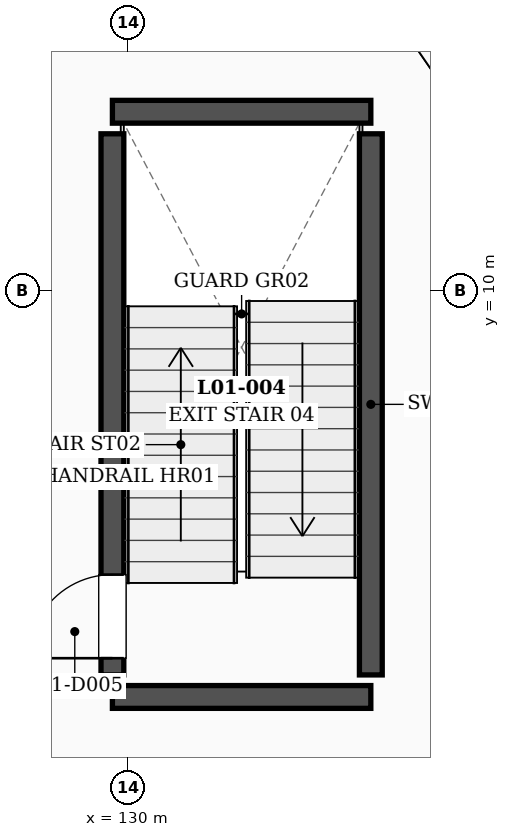
"""IFC4 building model, lengths in metres.
Left out: names, types, materials, properties, quantities, classifications, styles, units other than length and angle.
Written with IfcOpenShell. Run it as: python <this file> out.ifc"""

import sys

from ifc_helpers import new_model, si_unit, direction, frame, frame_2d, origin, place, context, subcontext, project, spatial, rectangle, extrude, element, fill, save


model = new_model("IFC4")
c1 = context("Model", 3, precision=1e-05, world=origin(), true_north=direction((0.0, 1.0)))
c2 = subcontext(c1, "Body", "Model", "MODEL_VIEW")
j1 = project(units=[si_unit("LENGTHUNIT", "METRE"), si_unit("PLANEANGLEUNIT", "RADIAN")], contexts=[c1])
p1 = place(None, origin())
s1 = spatial("IfcSite", under=j1, at=p1, CompositionType="ELEMENT")
p2 = place(p1, origin())
s2 = spatial("IfcBuilding", under=s1, at=p2, CompositionType="ELEMENT")
p3 = place(p2, frame((0.0, 0.0, 6.0)))
s3 = spatial("IfcBuildingStorey", under=s2, at=p3, CompositionType="ELEMENT", Elevation=6.0)
p4 = place(p3, frame((130.008, 1.697, 0.0), z_axis=(0.0, 0.0, 1.0), x_axis=(0.95182847269, 0.30663098111, 0.0)))
e1 = element("IfcWall", 1, at=p4, inside=s3, PredefinedType="SOLIDWALL", context=c2, shape_type="SweptSolid", body=[
    extrude(rectangle(XDim=9.785, YDim=0.32, at=frame_2d((4.893, 0.0))), origin(), (0.0, 0.0, 1.0), 3.61),
])
p5 = place(p4, frame((0.95, 0.0, 0.95)))
e2 = element("IfcOpeningElement", 2, at=p5, cuts=e1, PredefinedType="OPENING", context=c2, shape_type="SweptSolid", body=[
    extrude(rectangle(XDim=2.4, YDim=2.1, at=frame_2d((1.2, 1.05))), frame((0.0, 0.17, 0.0), z_axis=(0.0, -1.0, 0.0), x_axis=(1.0, 0.0, 0.0)), (0.0, 0.0, 1.0), 0.34),
])
p6 = place(p4, frame((6.435, 0.0, 0.95)))
e3 = element("IfcOpeningElement", 3, at=p6, cuts=e1, PredefinedType="OPENING", context=c2, shape_type="SweptSolid", body=[
    extrude(rectangle(XDim=2.4, YDim=2.1, at=frame_2d((1.2, 1.05))), frame((0.0, 0.17, 0.0), z_axis=(0.0, -1.0, 0.0), x_axis=(1.0, 0.0, 0.0)), (0.0, 0.0, 1.0), 0.34),
])
for number, where, z_axis, x_axis in (
    (4, (129.8, 4.65, 0.0), (0.0, 0.0, 1.0), (1.0, 0.0, 0.0)),
    (5, (129.8, 12.35, 0.0), (0.0, 0.0, 1.0), (1.0, 0.0, 0.0)),
):
    element("IfcWall", number, at=place(p3, frame(where, z_axis=z_axis, x_axis=x_axis)), inside=s3, PredefinedType="SHEAR", context=c2, shape_type="SweptSolid", body=[
        extrude(rectangle(XDim=3.4, YDim=0.3, at=frame_2d((1.7, 0.0))), origin(), (0.0, 0.0, 1.0), 4.8),
    ])
p7 = place(p3, frame((129.8, 4.94, 0.0), z_axis=(0.0, 0.0, 1.0), x_axis=(0.0, 1.0, 0.0)))
e6 = element("IfcWall", 6, at=p7, inside=s3, PredefinedType="SHEAR", context=c2, shape_type="SweptSolid", body=[
    extrude(rectangle(XDim=7.12, YDim=0.3, at=frame_2d((3.56, 0.0))), origin(), (0.0, 0.0, 1.0), 4.8),
])
p8 = place(p7, frame((0.22, 0.0, 0.0)))
e7 = element("IfcOpeningElement", 7, at=p8, cuts=e6, PredefinedType="OPENING", context=c2, shape_type="SweptSolid", body=[
    extrude(rectangle(XDim=1.1, YDim=2.2, at=frame_2d((0.55, 1.1))), frame((0.0, 0.16, 0.0), z_axis=(0.0, -1.0, 0.0), x_axis=(1.0, 0.0, 0.0)), (0.0, 0.0, 1.0), 0.32),
])
p9 = place(p3, frame((133.2, 4.94, 0.0), z_axis=(0.0, 0.0, 1.0), x_axis=(0.0, 1.0, 0.0)))
e8 = element("IfcWall", 8, at=p9, inside=s3, PredefinedType="SHEAR", context=c2, shape_type="SweptSolid", body=[
    extrude(rectangle(XDim=7.12, YDim=0.3, at=frame_2d((3.56, 0.0))), origin(), (0.0, 0.0, 1.0), 4.8),
])
p10 = place(p8, origin())
e9 = element("IfcDoor", 9, at=p10, inside=s3, OperationType="SINGLE_SWING_LEFT", PredefinedType="DOOR", context=c2, shape_type="SweptSolid", body=[
    extrude(rectangle(XDim=1.1, YDim=2.2, at=frame_2d((0.55, 1.1))), frame((0.0, 0.025, 0.0), z_axis=(0.0, -1.0, 0.0), x_axis=(1.0, 0.0, 0.0)), (0.0, 0.0, 1.0), 0.05),
])
fill(e7, e9)
save(model, sys.argv[1])
